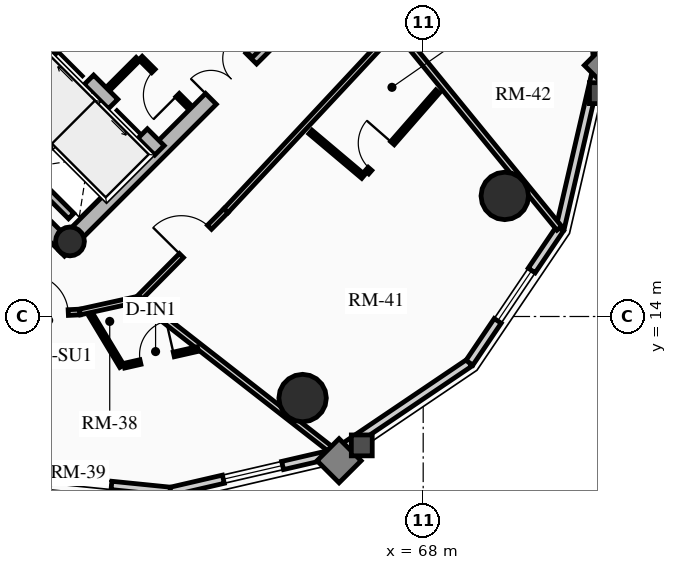
"""IFC4 building model, lengths in metres.
Left out: names, types, materials, properties, quantities, classifications, styles, units other than length and angle.
Written with IfcOpenShell. Run it as: python <this file> out.ifc"""

import sys

from ifc_helpers import new_model, si_unit, direction, frame, frame_2d, origin, origin_2d, place, context, subcontext, project, spatial, rectangle, circle, hollow_circle, extrude, source, transform, mapped, element, fill, save


model = new_model("IFC4")
c1 = context("Model", 3, precision=1e-05, world=origin(), true_north=direction((0.0, 1.0)))
c2 = subcontext(c1, "Body", "Model", "MODEL_VIEW")
j1 = project(units=[si_unit("LENGTHUNIT", "METRE"), si_unit("PLANEANGLEUNIT", "RADIAN")], contexts=[c1])
p1 = place(None, origin())
s1 = spatial("IfcSite", under=j1, at=p1, CompositionType="ELEMENT")
p2 = place(p1, origin())
s2 = spatial("IfcBuilding", under=s1, at=p2, CompositionType="ELEMENT")
p3 = place(p2, frame((0.0, 0.0, 177.79)))
s3 = spatial("IfcBuildingStorey", under=s2, at=p3, CompositionType="ELEMENT", Elevation=177.79)
p4 = place(p3, frame((58.702, 15.732, 0.0), z_axis=(0.0, 0.0, 1.0), x_axis=(-0.707106781187, 0.707106781187, 0.0)))
e1 = element("IfcWall", 1, at=p4, inside=s3, PredefinedType="SHEAR", context=c2, shape_type="SweptSolid", body=[
    extrude(rectangle(XDim=14.1, YDim=0.4, at=frame_2d((7.05, 0.0))), origin(), (0.0, 0.0, 1.0), 2.91),
])
p5 = place(p3, frame((58.561, 15.873, 0.0), z_axis=(0.0, 0.0, 1.0), x_axis=(0.707106781187, 0.707106781187, 0.0)))
e2 = element("IfcWall", 2, at=p5, inside=s3, PredefinedType="SHEAR", context=c2, shape_type="SweptSolid", body=[
    extrude(rectangle(XDim=10.7, YDim=0.4, at=frame_2d((5.35, 0.0))), origin(), (0.0, 0.0, 1.0), 2.91),
])
m1 = source(origin(), c2, "Body", "SweptSolid", [
    extrude(rectangle(XDim=1.5, YDim=2.02, at=frame_2d((0.75, 1.01))), frame((0.0, 0.21, 0.0), z_axis=(0.0, -1.0, 0.0), x_axis=(1.0, 0.0, 0.0)), (0.0, 0.0, 1.0), 0.42),
])
p6 = place(p5, frame((5.45, 0.0, 0.0)))
e3 = element("IfcOpeningElement", 3, at=p6, cuts=e2, PredefinedType="OPENING", context=c2, shape_type="MappedRepresentation", body=[
    mapped(m1, transform((0.0, 0.0, 0.0), x_axis=(1.0, 0.0, 0.0), y_axis=(0.0, 1.0, 0.0), z_axis=(0.0, 0.0, 1.0), scale=1.0)),
])
p7 = place(p3, frame((61.06, 18.373, 0.0), z_axis=(0.0, 0.0, 1.0), x_axis=(-0.707106781187, 0.707106781187, 0.0)))
e4 = element("IfcWall", 4, at=p7, inside=s3, PredefinedType="SHEAR", context=c2, shape_type="SweptSolid", body=[
    extrude(rectangle(XDim=13.7, YDim=0.35, at=frame_2d((6.85, 0.0))), origin(), (0.0, 0.0, 1.0), 2.91),
])
m2 = source(origin(), c2, "Body", "SweptSolid", [
    extrude(rectangle(XDim=1.1, YDim=2.015, at=frame_2d((0.55, 1.007))), frame((0.0, 0.185, 0.0), z_axis=(0.0, -1.0, 0.0), x_axis=(1.0, 0.0, 0.0)), (0.0, 0.0, 1.0), 0.37),
])
p8 = place(p7, frame((4.85, 0.0, 0.0)))
e5 = element("IfcOpeningElement", 5, at=p8, cuts=e4, PredefinedType="OPENING", context=c2, shape_type="MappedRepresentation", body=[
    mapped(m2, transform((0.0, 0.0, 0.0), x_axis=(1.0, 0.0, 0.0), y_axis=(0.0, 1.0, 0.0), z_axis=(0.0, 0.0, 1.0), scale=1.0)),
])
p9 = place(p7, frame((0.625, 0.0, 0.0)))
e6 = element("IfcOpeningElement", 6, at=p9, cuts=e4, PredefinedType="OPENING", context=c2, shape_type="MappedRepresentation", body=[
    mapped(m2, transform((0.0, 0.0, 0.0), x_axis=(1.0, 0.0, 0.0), y_axis=(0.0, 1.0, 0.0), z_axis=(0.0, 0.0, 1.0), scale=1.0)),
])
p10 = place(p7, frame((2.625, 0.0, 0.0)))
e7 = element("IfcOpeningElement", 7, at=p10, cuts=e4, PredefinedType="OPENING", context=c2, shape_type="MappedRepresentation", body=[
    mapped(m2, transform((0.0, 0.0, 0.0), x_axis=(1.0, 0.0, 0.0), y_axis=(0.0, 1.0, 0.0), z_axis=(0.0, 0.0, 1.0), scale=1.0)),
])
m3 = source(origin(), c2, "Body", "SweptSolid", [
    extrude(rectangle(XDim=1.15, YDim=2.02, at=frame_2d((0.575, 1.01))), frame((0.0, 0.185, 0.0), z_axis=(0.0, -1.0, 0.0), x_axis=(1.0, 0.0, 0.0)), (0.0, 0.0, 1.0), 0.37),
])
p11 = place(p7, frame((7.27, 0.0, 0.0)))
e8 = element("IfcOpeningElement", 8, at=p11, cuts=e4, PredefinedType="OPENING", context=c2, shape_type="MappedRepresentation", body=[
    mapped(m3, transform((0.0, 0.0, 0.0), x_axis=(1.0, 0.0, 0.0), y_axis=(0.0, 1.0, 0.0), z_axis=(0.0, 0.0, 1.0), scale=1.0)),
])
p12 = place(p3, frame((63.627, 20.94, 0.0), z_axis=(0.0, 0.0, 1.0), x_axis=(-0.707119496762, 0.707094065383, 0.0)))
e9 = element("IfcWall", 9, at=p12, inside=s3, PredefinedType="SHEAR", context=c2, shape_type="SweptSolid", body=[
    extrude(rectangle(XDim=9.6, YDim=0.35, at=frame_2d((4.8, 0.0))), origin(), (0.0, 0.0, 1.0), 2.91),
])
p13 = place(p12, frame((5.28, 0.0, 0.0)))
e10 = element("IfcOpeningElement", 10, at=p13, cuts=e9, PredefinedType="OPENING", context=c2, shape_type="MappedRepresentation", body=[
    mapped(m3, transform((0.0, 0.0, 0.0), x_axis=(1.0, 0.0, 0.0), y_axis=(0.0, 1.0, 0.0), z_axis=(0.0, 0.0, 1.0), scale=1.0)),
])
p14 = place(p3, frame((58.706, 15.976, 0.0), z_axis=(0.0, 0.0, 1.0), x_axis=(0.707106781187, 0.707106781187, 0.0)))
e11 = element("IfcColumn", 11, at=p14, inside=s3, PredefinedType="COLUMN", context=c2, shape_type="SweptSolid", body=[
    extrude(hollow_circle(Radius=0.38, WallThickness=0.032, at=origin_2d()), origin(), (0.0, 0.0, 1.0), 2.91),
])
for number, where, z_axis, x_axis in (
    (12, (64.827, 11.854, 0.0), (0.0, 0.0, 1.0), (1.0, 0.0, 0.0)),
    (13, (70.146, 17.173, 0.0), (0.0, 0.0, 1.0), (1.0, 0.0, 0.0)),
):
    element("IfcColumn", number, at=place(p3, frame(where, z_axis=z_axis, x_axis=x_axis)), inside=s3, PredefinedType="USERDEFINED", context=c2, shape_type="SweptSolid", body=[
        extrude(circle(Radius=0.625, at=origin_2d()), origin(), (0.0, 0.0, 1.0), 2.91),
    ])
p15 = place(p3, frame((61.355, 9.397, 0.0), z_axis=(0.0, 0.0, 1.0), x_axis=(-0.994943283129, 0.100438356004, 0.0)))
e14 = element("IfcWall", 14, at=p15, inside=s3, PredefinedType="SOLIDWALL", context=c2, shape_type="SweptSolid", body=[
    extrude(rectangle(XDim=4.733, YDim=0.22, at=frame_2d((2.366, 0.0))), origin(), (0.0, 0.0, 1.0), 2.245),
])
m4 = source(origin(), c2, "Body", "SweptSolid", [
    extrude(rectangle(XDim=1.6, YDim=1.3, at=frame_2d((0.8, 0.65))), frame((0.0, 0.12, 0.0), z_axis=(0.0, -1.0, 0.0), x_axis=(1.0, 0.0, 0.0)), (0.0, 0.0, 1.0), 0.24),
])
p16 = place(p15, frame((1.566, 0.0, 0.65)))
e15 = element("IfcOpeningElement", 15, at=p16, cuts=e14, PredefinedType="OPENING", context=c2, shape_type="MappedRepresentation", body=[
    mapped(m4, transform((0.0, 0.0, 0.0), x_axis=(1.0, 0.0, 0.0), y_axis=(0.0, 1.0, 0.0), z_axis=(0.0, 0.0, 1.0), scale=1.0)),
])
p17 = place(p3, frame((65.687, 10.4, 0.0), z_axis=(0.0, 0.0, 1.0), x_axis=(-0.97422620202, -0.22557328587, 0.0)))
e16 = element("IfcWall", 16, at=p17, inside=s3, PredefinedType="SOLIDWALL", context=c2, shape_type="SweptSolid", body=[
    extrude(rectangle(XDim=4.446, YDim=0.22, at=frame_2d((2.223, 0.0))), origin(), (0.0, 0.0, 1.0), 2.245),
])
p18 = place(p17, frame((1.423, 0.0, 0.65)))
e17 = element("IfcOpeningElement", 17, at=p18, cuts=e16, PredefinedType="OPENING", context=c2, shape_type="MappedRepresentation", body=[
    mapped(m4, transform((0.0, 0.0, 0.0), x_axis=(1.0, 0.0, 0.0), y_axis=(0.0, 1.0, 0.0), z_axis=(0.0, 0.0, 1.0), scale=1.0)),
])
p19 = place(p3, frame((69.217, 12.783, 0.0), z_axis=(0.0, 0.0, 1.0), x_axis=(-0.828817439852, -0.55951912514, 0.0)))
e18 = element("IfcWall", 18, at=p19, inside=s3, PredefinedType="SOLIDWALL", context=c2, shape_type="SweptSolid", body=[
    extrude(rectangle(XDim=4.259, YDim=0.22, at=frame_2d((2.129, 0.0))), origin(), (0.0, 0.0, 1.0), 2.245),
])
p20 = place(p3, frame((71.6, 16.313, 0.0), z_axis=(0.0, 0.0, 1.0), x_axis=(-0.55951912514, -0.828817439852, 0.0)))
e19 = element("IfcWall", 19, at=p20, inside=s3, PredefinedType="SOLIDWALL", context=c2, shape_type="SweptSolid", body=[
    extrude(rectangle(XDim=4.259, YDim=0.22, at=frame_2d((2.129, 0.0))), origin(), (0.0, 0.0, 1.0), 2.245),
])
p21 = place(p20, frame((1.33, 0.0, 0.65)))
e20 = element("IfcOpeningElement", 20, at=p21, cuts=e19, PredefinedType="OPENING", context=c2, shape_type="MappedRepresentation", body=[
    mapped(m4, transform((0.0, 0.0, 0.0), x_axis=(1.0, 0.0, 0.0), y_axis=(0.0, 1.0, 0.0), z_axis=(0.0, 0.0, 1.0), scale=1.0)),
])
p22 = place(p3, frame((72.603, 20.645, 0.0), z_axis=(0.0, 0.0, 1.0), x_axis=(-0.22557328587, -0.97422620202, 0.0)))
e21 = element("IfcWall", 21, at=p22, inside=s3, PredefinedType="SOLIDWALL", context=c2, shape_type="SweptSolid", body=[
    extrude(rectangle(XDim=4.446, YDim=0.22, at=frame_2d((2.223, 0.0))), origin(), (0.0, 0.0, 1.0), 2.245),
])
p23 = place(p3, frame((72.127, 25.354, 0.0), z_axis=(0.0, 0.0, 1.0), x_axis=(0.100438356004, -0.994943283129, 0.0)))
e22 = element("IfcWall", 22, at=p23, inside=s3, PredefinedType="SOLIDWALL", context=c2, shape_type="SweptSolid", body=[
    extrude(rectangle(XDim=4.733, YDim=0.22, at=frame_2d((2.366, 0.0))), origin(), (0.0, 0.0, 1.0), 2.245),
])
m5 = source(origin(), c2, "Body", "SweptSolid", [
    extrude(rectangle(XDim=1.15, YDim=2.005, at=frame_2d((0.575, 1.002))), frame((0.0, 0.12, 0.0), z_axis=(0.0, -1.0, 0.0), x_axis=(1.0, 0.0, 0.0)), (0.0, 0.0, 1.0), 0.24),
])
p24 = place(p23, frame((1.791, 0.0, 0.0)))
e23 = element("IfcOpeningElement", 23, at=p24, cuts=e22, PredefinedType="OPENING", context=c2, shape_type="MappedRepresentation", body=[
    mapped(m5, transform((0.0, 0.0, 0.0), x_axis=(1.0, 0.0, 0.0), y_axis=(0.0, 1.0, 0.0), z_axis=(0.0, 0.0, 1.0), scale=1.0)),
])
p25 = place(p3, frame((57.284, 17.673, 0.0), z_axis=(0.0, 0.0, 1.0), x_axis=(0.707147878904, 0.70706568108, 0.0)))
e24 = element("IfcWall", 24, at=p25, inside=s3, PredefinedType="SHEAR", context=c2, shape_type="SweptSolid", body=[
    extrude(rectangle(XDim=2.97, YDim=0.2, at=frame_2d((1.485, 0.0))), origin(), (0.0, 0.0, 1.0), 2.91),
])
p26 = place(p3, frame((58.737, 16.644, 0.0), z_axis=(0.0, 0.0, 1.0), x_axis=(-0.707032117043, 0.707181437447, 0.0)))
e25 = element("IfcWall", 25, at=p26, inside=s3, PredefinedType="SHEAR", context=c2, shape_type="SweptSolid", body=[
    extrude(rectangle(XDim=1.635, YDim=0.2, at=frame_2d((0.817, 0.0))), origin(), (0.0, 0.0, 1.0), 2.91),
])
p27 = place(p3, frame((61.835, 19.529, 0.0), z_axis=(0.0, 0.0, 1.0), x_axis=(-0.707174592913, 0.707038962956, 0.0)))
e26 = element("IfcWall", 26, at=p27, inside=s3, PredefinedType="PARTITIONING", context=c2, shape_type="SweptSolid", body=[
    extrude(rectangle(XDim=1.8, YDim=0.125, at=frame_2d((0.9, 0.0))), origin(), (0.0, 0.0, 1.0), 2.675),
])
m6 = source(origin(), c2, "Body", "SweptSolid", [
    extrude(rectangle(XDim=0.9, YDim=2.005, at=frame_2d((0.45, 1.002))), frame((0.0, 0.073, 0.0), z_axis=(0.0, -1.0, 0.0), x_axis=(1.0, 0.0, 0.0)), (0.0, 0.0, 1.0), 0.145),
])
p28 = place(p27, frame((0.42, 0.0, 0.0)))
e27 = element("IfcOpeningElement", 27, at=p28, cuts=e26, PredefinedType="OPENING", context=c2, shape_type="MappedRepresentation", body=[
    mapped(m6, transform((0.0, 0.0, 0.0), x_axis=(1.0, 0.0, 0.0), y_axis=(0.0, 1.0, 0.0), z_axis=(0.0, 0.0, 1.0), scale=1.0)),
])
p29 = place(p3, frame((59.713, 19.996, 0.0), z_axis=(0.0, 0.0, 1.0), x_axis=(0.707217726, 0.706995818963, 0.0)))
e28 = element("IfcWall", 28, at=p29, inside=s3, PredefinedType="PARTITIONING", context=c2, shape_type="SweptSolid", body=[
    extrude(rectangle(XDim=1.1, YDim=0.125, at=frame_2d((0.55, 0.0))), origin(), (0.0, 0.0, 1.0), 2.675),
])
p30 = place(p3, frame((57.492, 14.048, 0.0), z_axis=(0.0, 0.0, 1.0), x_axis=(0.99885011351, 0.047942160364, 0.0)))
e29 = element("IfcWall", 29, at=p30, inside=s3, PredefinedType="PARTITIONING", context=c2, shape_type="SweptSolid", body=[
    extrude(rectangle(XDim=1.477, YDim=0.15, at=frame_2d((0.738, 0.0))), origin(), (0.0, 0.0, 1.0), 2.245),
])
m7 = source(origin(), c2, "Body", "SweptSolid", [
    extrude(rectangle(XDim=1.05, YDim=2.015, at=frame_2d((0.525, 1.007))), frame((0.0, 0.085, 0.0), z_axis=(0.0, -1.0, 0.0), x_axis=(1.0, 0.0, 0.0)), (0.0, 0.0, 1.0), 0.17),
])
p31 = place(p30, frame((0.12, 0.0, 0.0)))
e30 = element("IfcOpeningElement", 30, at=p31, cuts=e29, PredefinedType="OPENING", context=c2, shape_type="MappedRepresentation", body=[
    mapped(m7, transform((0.0, 0.0, 0.0), x_axis=(1.0, 0.0, 0.0), y_axis=(0.0, 1.0, 0.0), z_axis=(0.0, 0.0, 1.0), scale=1.0)),
])
p32 = place(p3, frame((58.967, 14.118, 0.0), z_axis=(0.0, 0.0, 1.0), x_axis=(0.976471358036, 0.215647135235, 0.0)))
e31 = element("IfcWall", 31, at=p32, inside=s3, PredefinedType="PARTITIONING", context=c2, shape_type="SweptSolid", body=[
    extrude(rectangle(XDim=1.571, YDim=0.15, at=frame_2d((0.786, 0.0))), origin(), (0.0, 0.0, 1.0), 2.245),
])
p33 = place(p3, frame((60.501, 14.457, 0.0), z_axis=(0.0, 0.0, 1.0), x_axis=(0.704012266258, 0.710187812454, 0.0)))
e32 = element("IfcWall", 32, at=p33, inside=s3, PredefinedType="PARTITIONING", context=c2, shape_type="SweptSolid", body=[
    extrude(rectangle(XDim=3.281, YDim=0.15, at=frame_2d((1.641, 0.0))), origin(), (0.0, 0.0, 1.0), 2.245),
])
p34 = place(p33, frame((1.614, 0.0, 0.0)))
e33 = element("IfcOpeningElement", 33, at=p34, cuts=e32, PredefinedType="OPENING", context=c2, shape_type="MappedRepresentation", body=[
    mapped(m7, transform((0.0, 0.0, 0.0), x_axis=(1.0, 0.0, 0.0), y_axis=(0.0, 1.0, 0.0), z_axis=(0.0, 0.0, 1.0), scale=1.0)),
])
p35 = place(p3, frame((62.812, 16.788, 0.0), z_axis=(0.0, 0.0, 1.0), x_axis=(0.682323555485, 0.731050316757, 0.0)))
e34 = element("IfcWall", 34, at=p35, inside=s3, PredefinedType="PARTITIONING", context=c2, shape_type="SweptSolid", body=[
    extrude(rectangle(XDim=6.559, YDim=0.15, at=frame_2d((3.279, 0.0))), origin(), (0.0, 0.0, 1.0), 2.245),
])
p36 = place(p3, frame((60.501, 14.457, 0.0), z_axis=(0.0, 0.0, 1.0), x_axis=(0.788354052705, -0.61522181982, 0.0)))
e35 = element("IfcWall", 35, at=p36, inside=s3, PredefinedType="PARTITIONING", context=c2, shape_type="SweptSolid", body=[
    extrude(rectangle(XDim=6.566, YDim=0.16, at=frame_2d((3.283, 0.0))), origin(), (0.0, 0.0, 1.0), 2.245),
])
p37 = place(p3, frame((67.287, 21.582, 0.0), z_axis=(0.0, 0.0, 1.0), x_axis=(0.632528819581, -0.774536824431, 0.0)))
e36 = element("IfcWall", 36, at=p37, inside=s3, PredefinedType="PARTITIONING", context=c2, shape_type="SweptSolid", body=[
    extrude(rectangle(XDim=6.791, YDim=0.16, at=frame_2d((3.396, 0.0))), origin(), (0.0, 0.0, 1.0), 2.245),
])
p38 = place(p3, frame((59.265, 14.028, 0.0), z_axis=(0.0, 0.0, 1.0), x_axis=(0.515875690436, -0.856663453181, 0.0)))
e37 = element("IfcWall", 37, at=p38, inside=s3, PredefinedType="PARTITIONING", context=c2, shape_type="SweptSolid", body=[
    extrude(rectangle(XDim=1.56, YDim=0.125, at=frame_2d((0.78, 0.0))), origin(), (0.0, 0.0, 1.0), 2.245),
])
p39 = place(p3, frame((60.131, 12.705, 0.0), z_axis=(0.0, 0.0, 1.0), x_axis=(0.975184609806, 0.221393262767, 0.0)))
e38 = element("IfcWall", 38, at=p39, inside=s3, PredefinedType="PARTITIONING", context=c2, shape_type="SweptSolid", body=[
    extrude(rectangle(XDim=1.991, YDim=0.125, at=frame_2d((0.996, 0.0))), origin(), (0.0, 0.0, 1.0), 2.675),
])
p40 = place(p39, frame((0.439, 0.0, 0.0)))
e39 = element("IfcOpeningElement", 39, at=p40, cuts=e38, PredefinedType="OPENING", context=c2, shape_type="MappedRepresentation", body=[
    mapped(m6, transform((0.0, 0.0, 0.0), x_axis=(1.0, 0.0, 0.0), y_axis=(0.0, 1.0, 0.0), z_axis=(0.0, 0.0, 1.0), scale=1.0)),
])
p41 = place(p3, frame((65.033, 18.856, 0.0), z_axis=(0.0, 0.0, 1.0), x_axis=(0.764632588969, -0.644466449, 0.0)))
e40 = element("IfcWall", 40, at=p41, inside=s3, PredefinedType="PARTITIONING", context=c2, shape_type="SweptSolid", body=[
    extrude(rectangle(XDim=1.818, YDim=0.125, at=frame_2d((0.909, 0.0))), origin(), (0.0, 0.0, 1.0), 2.675),
])
p42 = place(p3, frame((66.52, 17.795, 0.0), z_axis=(0.0, 0.0, 1.0), x_axis=(0.658266024679, 0.752785388244, 0.0)))
e41 = element("IfcWall", 41, at=p42, inside=s3, PredefinedType="PARTITIONING", context=c2, shape_type="SweptSolid", body=[
    extrude(rectangle(XDim=2.826, YDim=0.125, at=frame_2d((1.413, 0.0))), origin(), (0.0, 0.0, 1.0), 2.245),
])
p43 = place(p42, frame((0.12, 0.0, 0.0)))
e42 = element("IfcOpeningElement", 42, at=p43, cuts=e41, PredefinedType="OPENING", context=c2, shape_type="MappedRepresentation", body=[
    mapped(m6, transform((0.0, 0.0, 0.0), x_axis=(1.0, 0.0, 0.0), y_axis=(0.0, 1.0, 0.0), z_axis=(0.0, 0.0, 1.0), scale=1.0)),
])
m8 = source(origin(), c2, "Body", "SweptSolid", [
    extrude(rectangle(XDim=1.6, YDim=1.3, at=frame_2d((0.8, 0.65))), frame((0.0, 0.03, 0.0), z_axis=(0.0, -1.0, 0.0), x_axis=(1.0, 0.0, 0.0)), (0.0, 0.0, 1.0), 0.06),
])
p44 = place(p16, origin())
e43 = element("IfcWindow", 43, at=p44, inside=s3, PartitioningType="SINGLE_PANEL", PredefinedType="WINDOW", context=c2, shape_type="MappedRepresentation", body=[
    mapped(m8, transform((0.0, 0.0, 0.0), x_axis=(1.0, 0.0, 0.0), y_axis=(0.0, 1.0, 0.0), z_axis=(0.0, 0.0, 1.0), scale=1.0)),
])
fill(e15, e43)
p45 = place(p18, origin())
e44 = element("IfcWindow", 44, at=p45, inside=s3, PartitioningType="SINGLE_PANEL", PredefinedType="WINDOW", context=c2, shape_type="MappedRepresentation", body=[
    mapped(m8, transform((0.0, 0.0, 0.0), x_axis=(1.0, 0.0, 0.0), y_axis=(0.0, 1.0, 0.0), z_axis=(0.0, 0.0, 1.0), scale=1.0)),
])
fill(e17, e44)
p46 = place(p21, origin())
e45 = element("IfcWindow", 45, at=p46, inside=s3, PartitioningType="SINGLE_PANEL", PredefinedType="WINDOW", context=c2, shape_type="MappedRepresentation", body=[
    mapped(m8, transform((0.0, 0.0, 0.0), x_axis=(1.0, 0.0, 0.0), y_axis=(0.0, 1.0, 0.0), z_axis=(0.0, 0.0, 1.0), scale=1.0)),
])
fill(e20, e45)
m9 = source(origin(), c2, "Body", "SweptSolid", [
    extrude(rectangle(XDim=1.1, YDim=2.015, at=frame_2d((0.55, 1.007))), frame((0.0, 0.025, 0.0), z_axis=(0.0, -1.0, 0.0), x_axis=(1.0, 0.0, 0.0)), (0.0, 0.0, 1.0), 0.05),
])
p47 = place(p9, origin())
e46 = element("IfcDoor", 46, at=p47, inside=s3, OperationType="SLIDING_TO_LEFT", PredefinedType="DOOR", context=c2, shape_type="MappedRepresentation", body=[
    mapped(m9, transform((0.0, 0.0, 0.0), x_axis=(1.0, 0.0, 0.0), y_axis=(0.0, 1.0, 0.0), z_axis=(0.0, 0.0, 1.0), scale=1.0)),
])
fill(e6, e46)
p48 = place(p10, origin())
e47 = element("IfcDoor", 47, at=p48, inside=s3, OperationType="SLIDING_TO_RIGHT", PredefinedType="DOOR", context=c2, shape_type="MappedRepresentation", body=[
    mapped(m9, transform((0.0, 0.0, 0.0), x_axis=(1.0, 0.0, 0.0), y_axis=(0.0, 1.0, 0.0), z_axis=(0.0, 0.0, 1.0), scale=1.0)),
])
fill(e7, e47)
m10 = source(origin(), c2, "Body", "SweptSolid", [
    extrude(rectangle(XDim=1.5, YDim=2.02, at=frame_2d((0.75, 1.01))), frame((0.0, 0.025, 0.0), z_axis=(0.0, -1.0, 0.0), x_axis=(1.0, 0.0, 0.0)), (0.0, 0.0, 1.0), 0.05),
])
p49 = place(p6, origin())
e48 = element("IfcDoor", 48, at=p49, inside=s3, OperationType="DOUBLE_DOOR_SINGLE_SWING", PredefinedType="DOOR", context=c2, shape_type="MappedRepresentation", body=[
    mapped(m10, transform((0.0, 0.0, 0.0), x_axis=(1.0, 0.0, 0.0), y_axis=(0.0, 1.0, 0.0), z_axis=(0.0, 0.0, 1.0), scale=1.0)),
])
fill(e3, e48)
m11 = source(origin(), c2, "Body", "SweptSolid", [
    extrude(rectangle(XDim=0.9, YDim=2.005, at=frame_2d((0.45, 1.002))), frame((0.0, 0.025, 0.0), z_axis=(0.0, -1.0, 0.0), x_axis=(1.0, 0.0, 0.0)), (0.0, 0.0, 1.0), 0.05),
])
p50 = place(p28, origin())
e49 = element("IfcDoor", 49, at=p50, inside=s3, OperationType="SINGLE_SWING_LEFT", PredefinedType="DOOR", context=c2, shape_type="MappedRepresentation", body=[
    mapped(m11, transform((0.0, 0.0, 0.0), x_axis=(1.0, 0.0, 0.0), y_axis=(0.0, 1.0, 0.0), z_axis=(0.0, 0.0, 1.0), scale=1.0)),
])
fill(e27, e49)
m12 = source(origin(), c2, "Body", "SweptSolid", [
    extrude(rectangle(XDim=1.05, YDim=2.015, at=frame_2d((0.525, 1.007))), frame((0.0, 0.025, 0.0), z_axis=(0.0, -1.0, 0.0), x_axis=(1.0, 0.0, 0.0)), (0.0, 0.0, 1.0), 0.05),
])
p51 = place(p31, origin())
e50 = element("IfcDoor", 50, at=p51, inside=s3, OperationType="SINGLE_SWING_LEFT", PredefinedType="DOOR", context=c2, shape_type="MappedRepresentation", body=[
    mapped(m12, transform((0.0, 0.0, 0.0), x_axis=(1.0, 0.0, 0.0), y_axis=(0.0, 1.0, 0.0), z_axis=(0.0, 0.0, 1.0), scale=1.0)),
])
fill(e30, e50)
p52 = place(p40, origin())
e51 = element("IfcDoor", 51, at=p52, inside=s3, OperationType="SINGLE_SWING_RIGHT", PredefinedType="DOOR", context=c2, shape_type="MappedRepresentation", body=[
    mapped(m11, transform((0.0, 0.0, 0.0), x_axis=(1.0, 0.0, 0.0), y_axis=(0.0, 1.0, 0.0), z_axis=(0.0, 0.0, 1.0), scale=1.0)),
])
fill(e39, e51)
p53 = place(p34, origin())
e52 = element("IfcDoor", 52, at=p53, inside=s3, OperationType="SINGLE_SWING_LEFT", PredefinedType="DOOR", context=c2, shape_type="MappedRepresentation", body=[
    mapped(m12, transform((0.0, 0.0, 0.0), x_axis=(1.0, 0.0, 0.0), y_axis=(0.0, 1.0, 0.0), z_axis=(0.0, 0.0, 1.0), scale=1.0)),
])
fill(e33, e52)
p54 = place(p43, origin())
e53 = element("IfcDoor", 53, at=p54, inside=s3, OperationType="SINGLE_SWING_RIGHT", PredefinedType="DOOR", context=c2, shape_type="MappedRepresentation", body=[
    mapped(m11, transform((0.0, 0.0, 0.0), x_axis=(1.0, 0.0, 0.0), y_axis=(0.0, 1.0, 0.0), z_axis=(0.0, 0.0, 1.0), scale=1.0)),
])
fill(e42, e53)
save(model, sys.argv[1])
